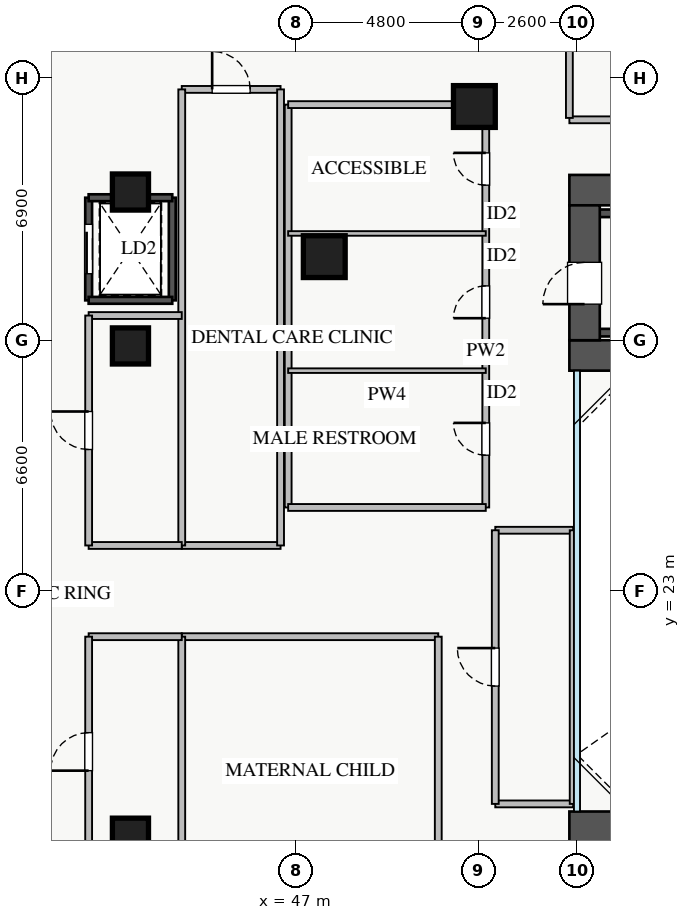
"""IFC4 building model, lengths in metres.
Left out: names, types, materials, properties, quantities, classifications, styles, units other than length and angle.
Written with IfcOpenShell. Run it as: python <this file> out.ifc"""

import sys

from ifc_helpers import new_model, si_unit, direction, frame, frame_2d, origin, origin_2d, place, context, subcontext, project, spatial, rectangle, extrude, source, transform, mapped, element, fill, save


model = new_model("IFC4")
c1 = context("Model", 3, precision=1e-05, world=origin(), true_north=direction((0.0, 1.0)))
c2 = subcontext(c1, "Body", "Model", "MODEL_VIEW")
j1 = project(units=[si_unit("LENGTHUNIT", "METRE"), si_unit("PLANEANGLEUNIT", "RADIAN")], contexts=[c1])
p1 = place(None, origin())
s1 = spatial("IfcSite", under=j1, at=p1, CompositionType="ELEMENT")
p2 = place(p1, origin())
s2 = spatial("IfcBuilding", under=s1, at=p2, CompositionType="ELEMENT")
p3 = place(p2, frame((0.0, 0.0, 13.8)))
s3 = spatial("IfcBuildingStorey", under=s2, at=p3, CompositionType="ELEMENT", Elevation=13.8)
p4 = place(p3, frame((41.55, 30.65, 0.0), z_axis=(0.0, 0.0, 1.0), x_axis=(0.0, 1.0, 0.0)))
e1 = element("IfcWall", 1, at=p4, inside=s3, PredefinedType="SHEAR", context=c2, shape_type="SweptSolid", body=[
    extrude(rectangle(XDim=2.7, YDim=0.18, at=frame_2d((1.35, 0.0))), origin(), (0.0, 0.0, 1.0), 4.15),
])
p5 = place(p4, frame((0.7, 0.0, 0.0)))
e2 = element("IfcOpeningElement", 2, at=p5, cuts=e1, PredefinedType="OPENING", context=c2, shape_type="SweptSolid", body=[
    extrude(rectangle(XDim=1.3, YDim=2.05, at=frame_2d((0.65, 1.025))), frame((0.0, 0.1, 0.0), z_axis=(0.0, -1.0, 0.0), x_axis=(1.0, 0.0, 0.0)), (0.0, 0.0, 1.0), 0.2),
])
p6 = place(p3, frame((43.75, 30.65, 0.0), z_axis=(0.0, 0.0, 1.0), x_axis=(0.0, 1.0, 0.0)))
e3 = element("IfcWall", 3, at=p6, inside=s3, PredefinedType="SHEAR", context=c2, shape_type="SweptSolid", body=[
    extrude(rectangle(XDim=2.7, YDim=0.18, at=frame_2d((1.35, 0.0))), origin(), (0.0, 0.0, 1.0), 4.15),
])
for number, where, z_axis, x_axis in (
    (4, (41.55, 30.65, 0.0), (0.0, 0.0, 1.0), (1.0, 0.0, 0.0)),
    (5, (41.55, 33.35, 0.0), (0.0, 0.0, 1.0), (1.0, 0.0, 0.0)),
):
    element("IfcWall", number, at=place(p3, frame(where, z_axis=z_axis, x_axis=x_axis)), inside=s3, PredefinedType="SHEAR", context=c2, shape_type="SweptSolid", body=[
        extrude(rectangle(XDim=2.2, YDim=0.18, at=frame_2d((1.1, 0.0))), origin(), (0.0, 0.0, 1.0), 4.15),
    ])
for number, where, z_axis, x_axis in (
    (6, (54.8, 29.8, 0.0), (0.0, 0.0, 1.0), (1.0, 0.0, 0.0)),
    (7, (54.8, 32.94, 0.0), (0.0, 0.0, 1.0), (1.0, 0.0, 0.0)),
):
    element("IfcWall", number, at=place(p3, frame(where, z_axis=z_axis, x_axis=x_axis)), inside=s3, PredefinedType="SHEAR", context=c2, shape_type="SweptSolid", body=[
        extrude(rectangle(XDim=7.15, YDim=0.2, at=frame_2d((3.575, 0.0))), origin(), (0.0, 0.0, 1.0), 4.4),
    ])
p7 = place(p3, frame((54.2, 29.2, 0.0), z_axis=(0.0, 0.0, 1.0), x_axis=(1.0, 0.0, 0.0)))
e8 = element("IfcWall", 8, at=p7, inside=s3, PredefinedType="SHEAR", context=c2, shape_type="SweptSolid", body=[
    extrude(rectangle(XDim=12.6, YDim=0.8, at=frame_2d((6.3, 0.0))), origin(), (0.0, 0.0, 1.0), 4.4),
])
p8 = place(p3, frame((54.2, 33.55, 0.0), z_axis=(0.0, 0.0, 1.0), x_axis=(1.0, 0.0, 0.0)))
e9 = element("IfcWall", 9, at=p8, inside=s3, PredefinedType="SHEAR", context=c2, shape_type="SweptSolid", body=[
    extrude(rectangle(XDim=12.6, YDim=0.8, at=frame_2d((6.3, 0.0))), origin(), (0.0, 0.0, 1.0), 4.4),
])
p9 = place(p8, frame((8.2, 0.0, 0.0)))
e10 = element("IfcOpeningElement", 10, at=p9, cuts=e9, PredefinedType="OPENING", context=c2, shape_type="SweptSolid", body=[
    extrude(rectangle(XDim=1.1, YDim=2.05, at=frame_2d((0.55, 1.025))), frame((0.0, 0.41, 0.0), z_axis=(0.0, -1.0, 0.0), x_axis=(1.0, 0.0, 0.0)), (0.0, 0.0, 1.0), 0.82),
])
p10 = place(p3, frame((54.6, 29.6, 0.0), z_axis=(0.0, 0.0, 1.0), x_axis=(0.0, 1.0, 0.0)))
e11 = element("IfcWall", 11, at=p10, inside=s3, PredefinedType="SHEAR", context=c2, shape_type="SweptSolid", body=[
    extrude(rectangle(XDim=3.55, YDim=0.8, at=frame_2d((1.775, 0.0))), origin(), (0.0, 0.0, 1.0), 4.4),
])
p11 = place(p10, frame((0.95, 0.0, 0.0)))
e12 = element("IfcOpeningElement", 12, at=p11, cuts=e11, PredefinedType="OPENING", context=c2, shape_type="SweptSolid", body=[
    extrude(rectangle(XDim=1.1, YDim=2.05, at=frame_2d((0.55, 1.025))), frame((0.0, 0.41, 0.0), z_axis=(0.0, -1.0, 0.0), x_axis=(1.0, 0.0, 0.0)), (0.0, 0.0, 1.0), 0.82),
])
p12 = place(p3, frame((54.2, 16.8, 0.0), z_axis=(0.0, 0.0, 1.0), x_axis=(1.0, 0.0, 0.0)))
e13 = element("IfcWall", 13, at=p12, inside=s3, PredefinedType="SHEAR", context=c2, shape_type="SweptSolid", body=[
    extrude(rectangle(XDim=12.6, YDim=0.8, at=frame_2d((6.3, 0.0))), origin(), (0.0, 0.0, 1.0), 4.4),
])
m1 = source(origin(), c2, "Body", "SweptSolid", [
    extrude(rectangle(XDim=1.1, YDim=1.1, at=origin_2d()), origin(), (0.0, 0.0, 1.0), 4.4),
])
for number, where, z_axis, x_axis in (
    (14, (51.7, 35.75, 0.0), (0.0, 0.0, 1.0), (1.0, 0.0, 0.0)),
    (15, (47.75, 31.8, 0.0), (0.0, 0.0, 1.0), (1.0, 0.0, 0.0)),
):
    element("IfcColumn", number, at=place(p3, frame(where, z_axis=z_axis, x_axis=x_axis)), inside=s3, PredefinedType="COLUMN", context=c2, shape_type="MappedRepresentation", body=[
        mapped(m1, transform((0.0, 0.0, 0.0), x_axis=(1.0, 0.0, 0.0), y_axis=(0.0, 1.0, 0.0), z_axis=(0.0, 0.0, 1.0), scale=1.0)),
    ])
m2 = source(origin(), c2, "Body", "SweptSolid", [
    extrude(rectangle(XDim=0.95, YDim=0.95, at=origin_2d()), origin(), (0.0, 0.0, 1.0), 4.4),
])
for number, where, z_axis, x_axis in (
    (16, (42.65, 16.55, 0.0), (0.0, 0.0, 1.0), (1.0, 0.0, 0.0)),
    (17, (42.65, 29.45, 0.0), (0.0, 0.0, 1.0), (1.0, 0.0, 0.0)),
    (18, (42.65, 33.5, 0.0), (0.0, 0.0, 1.0), (1.0, 0.0, 0.0)),
):
    element("IfcColumn", number, at=place(p3, frame(where, z_axis=z_axis, x_axis=x_axis)), inside=s3, PredefinedType="COLUMN", context=c2, shape_type="MappedRepresentation", body=[
        mapped(m2, transform((0.0, 0.0, 0.0), x_axis=(1.0, 0.0, 0.0), y_axis=(0.0, 1.0, 0.0), z_axis=(0.0, 0.0, 1.0), scale=1.0)),
    ])
p13 = place(p3, frame((52.0, 25.2, 0.0), z_axis=(0.0, 0.0, 1.0), x_axis=(0.0, 1.0, 0.0)))
e19 = element("IfcWall", 19, at=p13, inside=s3, PredefinedType="PARTITIONING", context=c2, shape_type="SweptSolid", body=[
    extrude(rectangle(XDim=10.6, YDim=0.18, at=frame_2d((5.3, 0.0))), origin(), (0.0, 0.0, 1.0), 4.15),
])
p14 = place(p13, frame((1.375, 0.0, 0.0)))
e20 = element("IfcOpeningElement", 20, at=p14, cuts=e19, PredefinedType="OPENING", context=c2, shape_type="SweptSolid", body=[
    extrude(rectangle(XDim=0.85, YDim=2.05, at=frame_2d((0.425, 1.025))), frame((0.0, 0.1, 0.0), z_axis=(0.0, -1.0, 0.0), x_axis=(1.0, 0.0, 0.0)), (0.0, 0.0, 1.0), 0.2),
])
p15 = place(p13, frame((4.98, 0.0, 0.0)))
e21 = element("IfcOpeningElement", 21, at=p15, cuts=e19, PredefinedType="OPENING", context=c2, shape_type="SweptSolid", body=[
    extrude(rectangle(XDim=0.85, YDim=2.05, at=frame_2d((0.425, 1.025))), frame((0.0, 0.1, 0.0), z_axis=(0.0, -1.0, 0.0), x_axis=(1.0, 0.0, 0.0)), (0.0, 0.0, 1.0), 0.2),
])
p16 = place(p13, frame((8.48, 0.0, 0.0)))
e22 = element("IfcOpeningElement", 22, at=p16, cuts=e19, PredefinedType="OPENING", context=c2, shape_type="SweptSolid", body=[
    extrude(rectangle(XDim=0.85, YDim=2.05, at=frame_2d((0.425, 1.025))), frame((0.0, 0.1, 0.0), z_axis=(0.0, -1.0, 0.0), x_axis=(1.0, 0.0, 0.0)), (0.0, 0.0, 1.0), 0.2),
])
p17 = place(p3, frame((46.8, 25.2, 0.0), z_axis=(0.0, 0.0, 1.0), x_axis=(0.0, 1.0, 0.0)))
e23 = element("IfcWall", 23, at=p17, inside=s3, PredefinedType="PARTITIONING", context=c2, shape_type="SweptSolid", body=[
    extrude(rectangle(XDim=10.6, YDim=0.18, at=frame_2d((5.3, 0.0))), origin(), (0.0, 0.0, 1.0), 4.15),
])
for number, where, z_axis, x_axis in (
    (24, (46.8, 25.2, 0.0), (0.0, 0.0, 1.0), (1.0, 0.0, 0.0)),
    (25, (46.8, 35.8, 0.0), (0.0, 0.0, 1.0), (1.0, 0.0, 0.0)),
):
    element("IfcWall", number, at=place(p3, frame(where, z_axis=z_axis, x_axis=x_axis)), inside=s3, PredefinedType="PARTITIONING", context=c2, shape_type="SweptSolid", body=[
        extrude(rectangle(XDim=5.2, YDim=0.18, at=frame_2d((2.6, 0.0))), origin(), (0.0, 0.0, 1.0), 4.15),
    ])
for number, where, z_axis, x_axis in (
    (26, (46.8, 28.8, 0.0), (0.0, 0.0, 1.0), (1.0, 0.0, 0.0)),
    (27, (46.8, 32.41, 0.0), (0.0, 0.0, 1.0), (1.0, 0.0, 0.0)),
):
    element("IfcWall", number, at=place(p3, frame(where, z_axis=z_axis, x_axis=x_axis)), inside=s3, PredefinedType="PLUMBINGWALL", context=c2, shape_type="SweptSolid", body=[
        extrude(rectangle(XDim=5.2, YDim=0.12, at=frame_2d((2.6, 0.0))), origin(), (0.0, 0.0, 1.0), 4.15),
    ])
p18 = place(p3, frame((44.0, 21.8, 0.0), z_axis=(0.0, 0.0, 1.0), x_axis=(1.0, 0.0, 0.0)))
e28 = element("IfcWall", 28, at=p18, inside=s3, PredefinedType="PARTITIONING", context=c2, shape_type="SweptSolid", body=[
    extrude(rectangle(XDim=6.75, YDim=0.18, at=frame_2d((3.375, 0.0))), origin(), (0.0, 0.0, 1.0), 4.15),
])
for number, where, z_axis, x_axis in (
    (29, (44.0, 9.8, 0.0), (0.0, 0.0, 1.0), (0.0, 1.0, 0.0)),
    (30, (50.75, 9.8, 0.0), (0.0, 0.0, 1.0), (0.0, 1.0, 0.0)),
):
    element("IfcWall", number, at=place(p3, frame(where, z_axis=z_axis, x_axis=x_axis)), inside=s3, PredefinedType="PARTITIONING", context=c2, shape_type="SweptSolid", body=[
        extrude(rectangle(XDim=12.0, YDim=0.18, at=frame_2d((6.0, 0.0))), origin(), (0.0, 0.0, 1.0), 4.15),
    ])
p19 = place(p3, frame((44.0, 24.2, 0.0), z_axis=(0.0, 0.0, 1.0), x_axis=(1.0, 0.0, 0.0)))
e31 = element("IfcWall", 31, at=p19, inside=s3, PredefinedType="PARTITIONING", context=c2, shape_type="SweptSolid", body=[
    extrude(rectangle(XDim=2.6, YDim=0.18, at=frame_2d((1.3, 0.0))), origin(), (0.0, 0.0, 1.0), 4.15),
])
p20 = place(p3, frame((44.0, 36.2, 0.0), z_axis=(0.0, 0.0, 1.0), x_axis=(1.0, 0.0, 0.0)))
e32 = element("IfcWall", 32, at=p20, inside=s3, PredefinedType="PARTITIONING", context=c2, shape_type="SweptSolid", body=[
    extrude(rectangle(XDim=2.6, YDim=0.18, at=frame_2d((1.3, 0.0))), origin(), (0.0, 0.0, 1.0), 4.15),
])
p21 = place(p20, frame((0.8, 0.0, 0.0)))
e33 = element("IfcOpeningElement", 33, at=p21, cuts=e32, PredefinedType="OPENING", context=c2, shape_type="SweptSolid", body=[
    extrude(rectangle(XDim=1.0, YDim=2.05, at=frame_2d((0.5, 1.025))), frame((0.0, 0.1, 0.0), z_axis=(0.0, -1.0, 0.0), x_axis=(1.0, 0.0, 0.0)), (0.0, 0.0, 1.0), 0.2),
])
for number, where, z_axis, x_axis in (
    (34, (44.0, 24.2, 0.0), (0.0, 0.0, 1.0), (0.0, 1.0, 0.0)),
    (35, (46.6, 24.2, 0.0), (0.0, 0.0, 1.0), (0.0, 1.0, 0.0)),
):
    element("IfcWall", number, at=place(p3, frame(where, z_axis=z_axis, x_axis=x_axis)), inside=s3, PredefinedType="PARTITIONING", context=c2, shape_type="SweptSolid", body=[
        extrude(rectangle(XDim=12.0, YDim=0.18, at=frame_2d((6.0, 0.0))), origin(), (0.0, 0.0, 1.0), 4.15),
    ])
for number, where, z_axis, x_axis in (
    (36, (41.55, 24.2, 0.0), (0.0, 0.0, 1.0), (1.0, 0.0, 0.0)),
    (37, (41.55, 30.25, 0.0), (0.0, 0.0, 1.0), (1.0, 0.0, 0.0)),
):
    element("IfcWall", number, at=place(p3, frame(where, z_axis=z_axis, x_axis=x_axis)), inside=s3, PredefinedType="PARTITIONING", context=c2, shape_type="SweptSolid", body=[
        extrude(rectangle(XDim=2.45, YDim=0.18, at=frame_2d((1.225, 0.0))), origin(), (0.0, 0.0, 1.0), 4.15),
    ])
p22 = place(p3, frame((41.55, 24.2, 0.0), z_axis=(0.0, 0.0, 1.0), x_axis=(0.0, 1.0, 0.0)))
e38 = element("IfcWall", 38, at=p22, inside=s3, PredefinedType="PARTITIONING", context=c2, shape_type="SweptSolid", body=[
    extrude(rectangle(XDim=6.05, YDim=0.18, at=frame_2d((3.025, 0.0))), origin(), (0.0, 0.0, 1.0), 4.15),
])
p23 = place(p22, frame((2.525, 0.0, 0.0)))
e39 = element("IfcOpeningElement", 39, at=p23, cuts=e38, PredefinedType="OPENING", context=c2, shape_type="SweptSolid", body=[
    extrude(rectangle(XDim=1.0, YDim=2.05, at=frame_2d((0.5, 1.025))), frame((0.0, 0.1, 0.0), z_axis=(0.0, -1.0, 0.0), x_axis=(1.0, 0.0, 0.0)), (0.0, 0.0, 1.0), 0.2),
])
p24 = place(p3, frame((41.55, 21.8, 0.0), z_axis=(0.0, 0.0, 1.0), x_axis=(1.0, 0.0, 0.0)))
e40 = element("IfcWall", 40, at=p24, inside=s3, PredefinedType="PARTITIONING", context=c2, shape_type="SweptSolid", body=[
    extrude(rectangle(XDim=2.45, YDim=0.18, at=frame_2d((1.225, 0.0))), origin(), (0.0, 0.0, 1.0), 4.15),
])
p25 = place(p3, frame((41.55, 15.75, 0.0), z_axis=(0.0, 0.0, 1.0), x_axis=(0.0, 1.0, 0.0)))
e41 = element("IfcWall", 41, at=p25, inside=s3, PredefinedType="PARTITIONING", context=c2, shape_type="SweptSolid", body=[
    extrude(rectangle(XDim=6.05, YDim=0.18, at=frame_2d((3.025, 0.0))), origin(), (0.0, 0.0, 1.0), 4.15),
])
p26 = place(p25, frame((2.525, 0.0, 0.0)))
e42 = element("IfcOpeningElement", 42, at=p26, cuts=e41, PredefinedType="OPENING", context=c2, shape_type="SweptSolid", body=[
    extrude(rectangle(XDim=1.0, YDim=2.05, at=frame_2d((0.5, 1.025))), frame((0.0, 0.1, 0.0), z_axis=(0.0, -1.0, 0.0), x_axis=(1.0, 0.0, 0.0)), (0.0, 0.0, 1.0), 0.2),
])
for number, where, z_axis, x_axis in (
    (43, (52.25, 17.4, 0.0), (0.0, 0.0, 1.0), (1.0, 0.0, 0.0)),
    (44, (52.25, 24.6, 0.0), (0.0, 0.0, 1.0), (1.0, 0.0, 0.0)),
):
    element("IfcWall", number, at=place(p3, frame(where, z_axis=z_axis, x_axis=x_axis)), inside=s3, PredefinedType="PARTITIONING", context=c2, shape_type="SweptSolid", body=[
        extrude(rectangle(XDim=2.05, YDim=0.18, at=frame_2d((1.025, 0.0))), origin(), (0.0, 0.0, 1.0), 4.15),
    ])
p27 = place(p3, frame((52.25, 17.4, 0.0), z_axis=(0.0, 0.0, 1.0), x_axis=(0.0, 1.0, 0.0)))
e45 = element("IfcWall", 45, at=p27, inside=s3, PredefinedType="PARTITIONING", context=c2, shape_type="SweptSolid", body=[
    extrude(rectangle(XDim=7.2, YDim=0.18, at=frame_2d((3.6, 0.0))), origin(), (0.0, 0.0, 1.0), 4.15),
])
p28 = place(p27, frame((3.1, 0.0, 0.0)))
e46 = element("IfcOpeningElement", 46, at=p28, cuts=e45, PredefinedType="OPENING", context=c2, shape_type="SweptSolid", body=[
    extrude(rectangle(XDim=1.0, YDim=2.05, at=frame_2d((0.5, 1.025))), frame((0.0, 0.1, 0.0), z_axis=(0.0, -1.0, 0.0), x_axis=(1.0, 0.0, 0.0)), (0.0, 0.0, 1.0), 0.2),
])
p29 = place(p3, frame((54.3, 17.4, 0.0), z_axis=(0.0, 0.0, 1.0), x_axis=(0.0, 1.0, 0.0)))
e47 = element("IfcWall", 47, at=p29, inside=s3, PredefinedType="PARTITIONING", context=c2, shape_type="SweptSolid", body=[
    extrude(rectangle(XDim=7.2, YDim=0.18, at=frame_2d((3.6, 0.0))), origin(), (0.0, 0.0, 1.0), 4.15),
])
p30 = place(p3, frame((54.2, 35.4, 0.0), z_axis=(0.0, 0.0, 1.0), x_axis=(1.0, 0.0, 0.0)))
e48 = element("IfcWall", 48, at=p30, inside=s3, PredefinedType="PARTITIONING", context=c2, shape_type="SweptSolid", body=[
    extrude(rectangle(XDim=19.55, YDim=0.18, at=frame_2d((9.775, 0.0))), origin(), (0.0, 0.0, 1.0), 4.15),
])
p31 = place(p30, frame((9.275, 0.0, 0.0)))
e49 = element("IfcOpeningElement", 49, at=p31, cuts=e48, PredefinedType="OPENING", context=c2, shape_type="SweptSolid", body=[
    extrude(rectangle(XDim=1.0, YDim=2.05, at=frame_2d((0.5, 1.025))), frame((0.0, 0.1, 0.0), z_axis=(0.0, -1.0, 0.0), x_axis=(1.0, 0.0, 0.0)), (0.0, 0.0, 1.0), 0.2),
])
p32 = place(p3, frame((54.2, 35.45, 0.0), z_axis=(0.0, 0.0, 1.0), x_axis=(0.0, 1.0, 0.0)))
e50 = element("IfcWall", 50, at=p32, inside=s3, PredefinedType="PARTITIONING", context=c2, shape_type="SweptSolid", body=[
    extrude(rectangle(XDim=4.8, YDim=0.18, at=frame_2d((2.4, 0.0))), origin(), (0.0, 0.0, 1.0), 4.15),
])
m3 = source(origin(), c2, "Body", "SweptSolid", [
    extrude(rectangle(XDim=1.1, YDim=2.05, at=frame_2d((0.55, 1.025))), frame((0.0, 0.025, 0.0), z_axis=(0.0, -1.0, 0.0), x_axis=(1.0, 0.0, 0.0)), (0.0, 0.0, 1.0), 0.05),
])
p33 = place(p11, origin())
e51 = element("IfcDoor", 51, at=p33, inside=s3, OperationType="SINGLE_SWING_LEFT", PredefinedType="DOOR", context=c2, shape_type="MappedRepresentation", body=[
    mapped(m3, transform((0.0, 0.0, 0.0), x_axis=(1.0, 0.0, 0.0), y_axis=(0.0, 1.0, 0.0), z_axis=(0.0, 0.0, 1.0), scale=1.0)),
])
fill(e12, e51)
m4 = source(origin(), c2, "Body", "SweptSolid", [
    extrude(rectangle(XDim=1.3, YDim=2.05, at=frame_2d((0.65, 1.025))), frame((0.0, 0.025, 0.0), z_axis=(0.0, -1.0, 0.0), x_axis=(1.0, 0.0, 0.0)), (0.0, 0.0, 1.0), 0.05),
])
p34 = place(p5, origin())
e52 = element("IfcDoor", 52, at=p34, inside=s3, OperationType="SLIDING_TO_LEFT", PredefinedType="DOOR", context=c2, shape_type="MappedRepresentation", body=[
    mapped(m4, transform((0.0, 0.0, 0.0), x_axis=(1.0, 0.0, 0.0), y_axis=(0.0, 1.0, 0.0), z_axis=(0.0, 0.0, 1.0), scale=1.0)),
])
fill(e2, e52)
m5 = source(origin(), c2, "Body", "SweptSolid", [
    extrude(rectangle(XDim=0.85, YDim=2.05, at=frame_2d((0.425, 1.025))), frame((0.0, 0.025, 0.0), z_axis=(0.0, -1.0, 0.0), x_axis=(1.0, 0.0, 0.0)), (0.0, 0.0, 1.0), 0.05),
])
p35 = place(p14, origin())
e53 = element("IfcDoor", 53, at=p35, inside=s3, OperationType="SINGLE_SWING_RIGHT", PredefinedType="DOOR", context=c2, shape_type="MappedRepresentation", body=[
    mapped(m5, transform((0.0, 0.0, 0.0), x_axis=(1.0, 0.0, 0.0), y_axis=(0.0, 1.0, 0.0), z_axis=(0.0, 0.0, 1.0), scale=1.0)),
])
fill(e20, e53)
p36 = place(p15, origin())
e54 = element("IfcDoor", 54, at=p36, inside=s3, OperationType="SINGLE_SWING_LEFT", PredefinedType="DOOR", context=c2, shape_type="MappedRepresentation", body=[
    mapped(m5, transform((0.0, 0.0, 0.0), x_axis=(1.0, 0.0, 0.0), y_axis=(0.0, 1.0, 0.0), z_axis=(0.0, 0.0, 1.0), scale=1.0)),
])
fill(e21, e54)
p37 = place(p16, origin())
e55 = element("IfcDoor", 55, at=p37, inside=s3, OperationType="SINGLE_SWING_RIGHT", PredefinedType="DOOR", context=c2, shape_type="MappedRepresentation", body=[
    mapped(m5, transform((0.0, 0.0, 0.0), x_axis=(1.0, 0.0, 0.0), y_axis=(0.0, 1.0, 0.0), z_axis=(0.0, 0.0, 1.0), scale=1.0)),
])
fill(e22, e55)
m6 = source(origin(), c2, "Body", "SweptSolid", [
    extrude(rectangle(XDim=1.0, YDim=2.05, at=frame_2d((0.5, 1.025))), frame((0.0, 0.025, 0.0), z_axis=(0.0, -1.0, 0.0), x_axis=(1.0, 0.0, 0.0)), (0.0, 0.0, 1.0), 0.05),
])
p38 = place(p21, origin())
e56 = element("IfcDoor", 56, at=p38, inside=s3, OperationType="SINGLE_SWING_LEFT", PredefinedType="DOOR", context=c2, shape_type="MappedRepresentation", body=[
    mapped(m6, transform((0.0, 0.0, 0.0), x_axis=(1.0, 0.0, 0.0), y_axis=(0.0, 1.0, 0.0), z_axis=(0.0, 0.0, 1.0), scale=1.0)),
])
fill(e33, e56)
p39 = place(p23, origin())
e57 = element("IfcDoor", 57, at=p39, inside=s3, OperationType="SINGLE_SWING_RIGHT", PredefinedType="DOOR", context=c2, shape_type="MappedRepresentation", body=[
    mapped(m6, transform((0.0, 0.0, 0.0), x_axis=(1.0, 0.0, 0.0), y_axis=(0.0, 1.0, 0.0), z_axis=(0.0, 0.0, 1.0), scale=1.0)),
])
fill(e39, e57)
p40 = place(p26, origin())
e58 = element("IfcDoor", 58, at=p40, inside=s3, OperationType="SINGLE_SWING_LEFT", PredefinedType="DOOR", context=c2, shape_type="MappedRepresentation", body=[
    mapped(m6, transform((0.0, 0.0, 0.0), x_axis=(1.0, 0.0, 0.0), y_axis=(0.0, 1.0, 0.0), z_axis=(0.0, 0.0, 1.0), scale=1.0)),
])
fill(e42, e58)
p41 = place(p28, origin())
e59 = element("IfcDoor", 59, at=p41, inside=s3, OperationType="SINGLE_SWING_RIGHT", PredefinedType="DOOR", context=c2, shape_type="MappedRepresentation", body=[
    mapped(m6, transform((0.0, 0.0, 0.0), x_axis=(1.0, 0.0, 0.0), y_axis=(0.0, 1.0, 0.0), z_axis=(0.0, 0.0, 1.0), scale=1.0)),
])
fill(e46, e59)
save(model, sys.argv[1])
